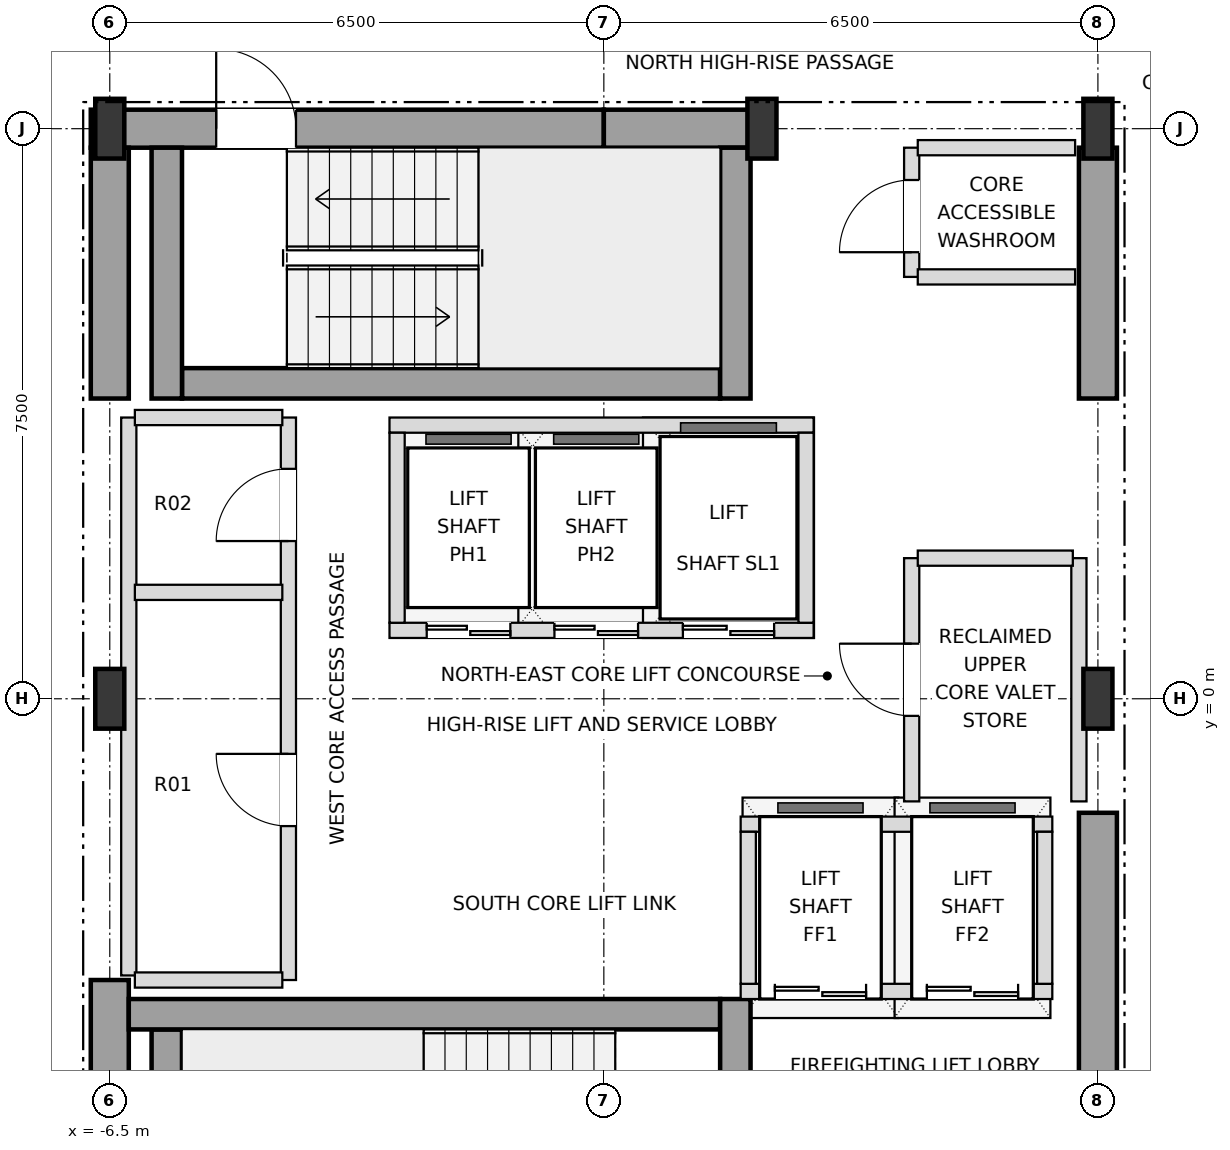
"""IFC4 building model, lengths in metres.
Left out: names, types, materials, properties, quantities, classifications, styles, units other than length and angle.
Written with IfcOpenShell. Run it as: python <this file> out.ifc"""

import sys

from ifc_helpers import new_model, si_unit, direction, frame, frame_2d, origin, origin_2d, place, context, subcontext, project, spatial, rectangle, i_section, extrude, element, fill, save


model = new_model("IFC4")
c1 = context("Model", 3, precision=1e-05, world=origin(), true_north=direction((0.0, 1.0)))
c2 = subcontext(c1, "Body", "Model", "MODEL_VIEW")
j1 = project(units=[si_unit("LENGTHUNIT", "METRE"), si_unit("PLANEANGLEUNIT", "RADIAN")], contexts=[c1])
p1 = place(None, origin())
s1 = spatial("IfcSite", under=j1, at=p1, CompositionType="ELEMENT")
p2 = place(p1, origin())
s2 = spatial("IfcBuilding", under=s1, at=p2, CompositionType="ELEMENT")
p3 = place(p2, frame((0.0, 0.0, 279.9)))
s3 = spatial("IfcBuildingStorey", under=s2, at=p3, CompositionType="ELEMENT", Elevation=279.9)
for number, where, z_axis, x_axis in (
    (1, (-6.5, 0.0, 0.0), (0.0, 0.0, 1.0), (1.0, 0.0, 0.0)),
    (2, (6.5, 0.0, 0.0), (0.0, 0.0, 1.0), (1.0, 0.0, 0.0)),
    (3, (-6.5, 7.5, 0.0), (0.0, 0.0, 1.0), (1.0, 0.0, 0.0)),
    (4, (2.08, 7.5, 0.0), (0.0, 0.0, 1.0), (1.0, 0.0, 0.0)),
    (5, (6.5, 7.5, 0.0), (0.0, 0.0, 1.0), (1.0, 0.0, 0.0)),
):
    element("IfcColumn", number, at=place(p3, frame(where, z_axis=z_axis, x_axis=x_axis)), inside=s3, PredefinedType="COLUMN", context=c2, shape_type="SweptSolid", body=[
        extrude(i_section(OverallWidth=0.382, OverallDepth=0.786, WebThickness=0.02, FlangeThickness=0.033, at=origin_2d()), origin(), (0.0, 0.0, 1.0), 3.6),
    ])
p4 = place(p3, frame((-6.75, 7.5, 0.0), z_axis=(0.0, 0.0, 1.0), x_axis=(1.0, 0.0, 0.0)))
e6 = element("IfcWall", 6, at=p4, inside=s3, PredefinedType="SHEAR", context=c2, shape_type="SweptSolid", body=[
    extrude(rectangle(XDim=6.75, YDim=0.5, at=frame_2d((3.375, 0.0))), origin(), (0.0, 0.0, 1.0), 3.38),
])
p5 = place(p4, frame((1.65, 0.0, 0.0)))
e7 = element("IfcOpeningElement", 7, at=p5, cuts=e6, PredefinedType="OPENING", context=c2, shape_type="SweptSolid", body=[
    extrude(rectangle(XDim=1.05, YDim=2.15, at=frame_2d((0.525, 1.075))), frame((0.0, 0.26, 0.0), z_axis=(0.0, -1.0, 0.0), x_axis=(1.0, 0.0, 0.0)), (0.0, 0.0, 1.0), 0.52),
])
p6 = place(p3, frame((0.0, 7.5, 0.0), z_axis=(0.0, 0.0, 1.0), x_axis=(1.0, 0.0, 0.0)))
e8 = element("IfcWall", 8, at=p6, inside=s3, PredefinedType="SHEAR", context=c2, shape_type="SweptSolid", body=[
    extrude(rectangle(XDim=2.08, YDim=0.5, at=frame_2d((1.04, 0.0))), origin(), (0.0, 0.0, 1.0), 3.38),
])
p7 = place(p3, frame((-6.5, -7.25, 0.0), z_axis=(0.0, 0.0, 1.0), x_axis=(0.0, 1.0, 0.0)))
e9 = element("IfcWall", 9, at=p7, inside=s3, PredefinedType="SHEAR", context=c2, shape_type="SweptSolid", body=[
    extrude(rectangle(XDim=3.55, YDim=0.5, at=frame_2d((1.775, 0.0))), origin(), (0.0, 0.0, 1.0), 3.38),
])
p8 = place(p3, frame((-6.5, 3.95, 0.0), z_axis=(0.0, 0.0, 1.0), x_axis=(0.0, 1.0, 0.0)))
e10 = element("IfcWall", 10, at=p8, inside=s3, PredefinedType="SHEAR", context=c2, shape_type="SweptSolid", body=[
    extrude(rectangle(XDim=3.3, YDim=0.5, at=frame_2d((1.65, 0.0))), origin(), (0.0, 0.0, 1.0), 3.38),
])
p9 = place(p3, frame((6.5, -7.25, 0.0), z_axis=(0.0, 0.0, 1.0), x_axis=(0.0, 1.0, 0.0)))
e11 = element("IfcWall", 11, at=p9, inside=s3, PredefinedType="SHEAR", context=c2, shape_type="SweptSolid", body=[
    extrude(rectangle(XDim=5.75, YDim=0.5, at=frame_2d((2.875, 0.0))), origin(), (0.0, 0.0, 1.0), 3.38),
])
p10 = place(p9, frame((0.85, 0.0, 0.0)))
e12 = element("IfcOpeningElement", 12, at=p10, cuts=e11, PredefinedType="OPENING", context=c2, shape_type="SweptSolid", body=[
    extrude(rectangle(XDim=1.05, YDim=2.15, at=frame_2d((0.525, 1.075))), frame((0.0, 0.26, 0.0), z_axis=(0.0, -1.0, 0.0), x_axis=(1.0, 0.0, 0.0)), (0.0, 0.0, 1.0), 0.52),
])
p11 = place(p3, frame((6.5, 3.95, 0.0), z_axis=(0.0, 0.0, 1.0), x_axis=(0.0, 1.0, 0.0)))
e13 = element("IfcWall", 13, at=p11, inside=s3, PredefinedType="SHEAR", context=c2, shape_type="SweptSolid", body=[
    extrude(rectangle(XDim=3.3, YDim=0.5, at=frame_2d((1.65, 0.0))), origin(), (0.0, 0.0, 1.0), 3.38),
])
p12 = place(p3, frame((-5.75, -7.25, 0.0), z_axis=(0.0, 0.0, 1.0), x_axis=(0.0, 1.0, 0.0)))
e14 = element("IfcWall", 14, at=p12, inside=s3, PredefinedType="SHEAR", context=c2, shape_type="SweptSolid", body=[
    extrude(rectangle(XDim=2.9, YDim=0.4, at=frame_2d((1.45, 0.0))), origin(), (0.0, 0.0, 1.0), 3.38),
])
p13 = place(p3, frame((-6.25, -4.15, 0.0), z_axis=(0.0, 0.0, 1.0), x_axis=(1.0, 0.0, 0.0)))
e15 = element("IfcWall", 15, at=p13, inside=s3, PredefinedType="SHEAR", context=c2, shape_type="SweptSolid", body=[
    extrude(rectangle(XDim=7.78, YDim=0.4, at=frame_2d((3.89, 0.0))), origin(), (0.0, 0.0, 1.0), 3.38),
])
p14 = place(p3, frame((1.73, -7.25, 0.0), z_axis=(0.0, 0.0, 1.0), x_axis=(0.0, 1.0, 0.0)))
e16 = element("IfcWall", 16, at=p14, inside=s3, PredefinedType="SHEAR", context=c2, shape_type="SweptSolid", body=[
    extrude(rectangle(XDim=3.3, YDim=0.4, at=frame_2d((1.65, 0.0))), origin(), (0.0, 0.0, 1.0), 3.38),
])
p15 = place(p14, frame((0.9, 0.0, 0.0)))
e17 = element("IfcOpeningElement", 17, at=p15, cuts=e16, PredefinedType="OPENING", context=c2, shape_type="SweptSolid", body=[
    extrude(rectangle(XDim=1.05, YDim=2.15, at=frame_2d((0.525, 1.075))), frame((0.0, 0.21, 0.0), z_axis=(0.0, -1.0, 0.0), x_axis=(1.0, 0.0, 0.0)), (0.0, 0.0, 1.0), 0.42),
])
p16 = place(p3, frame((-5.55, 4.15, 0.0), z_axis=(0.0, 0.0, 1.0), x_axis=(1.0, 0.0, 0.0)))
e18 = element("IfcWall", 18, at=p16, inside=s3, PredefinedType="SHEAR", context=c2, shape_type="SweptSolid", body=[
    extrude(rectangle(XDim=7.08, YDim=0.4, at=frame_2d((3.54, 0.0))), origin(), (0.0, 0.0, 1.0), 3.38),
])
for number, where, z_axis, x_axis in (
    (19, (1.73, 3.95, 0.0), (0.0, 0.0, 1.0), (0.0, 1.0, 0.0)),
    (20, (-5.75, 3.95, 0.0), (0.0, 0.0, 1.0), (0.0, 1.0, 0.0)),
):
    element("IfcWall", number, at=place(p3, frame(where, z_axis=z_axis, x_axis=x_axis)), inside=s3, PredefinedType="SHEAR", context=c2, shape_type="SweptSolid", body=[
        extrude(rectangle(XDim=3.3, YDim=0.4, at=frame_2d((1.65, 0.0))), origin(), (0.0, 0.0, 1.0), 3.38),
    ])
p17 = place(p3, frame((-2.82, 0.9, 0.0), z_axis=(0.0, 0.0, 1.0), x_axis=(1.0, 0.0, 0.0)))
e21 = element("IfcWall", 21, at=p17, inside=s3, PredefinedType="SOLIDWALL", context=c2, shape_type="SweptSolid", body=[
    extrude(rectangle(XDim=5.58, YDim=0.2, at=frame_2d((2.79, 0.0))), origin(), (0.0, 0.0, 1.0), 3.38),
])
p18 = place(p17, frame((0.49, 0.0, 0.0)))
e22 = element("IfcOpeningElement", 22, at=p18, cuts=e21, PredefinedType="OPENING", context=c2, shape_type="SweptSolid", body=[
    extrude(rectangle(XDim=1.1, YDim=2.15, at=frame_2d((0.55, 1.075))), frame((0.0, 0.11, 0.0), z_axis=(0.0, -1.0, 0.0), x_axis=(1.0, 0.0, 0.0)), (0.0, 0.0, 1.0), 0.22),
])
p19 = place(p17, frame((2.17, 0.0, 0.0)))
e23 = element("IfcOpeningElement", 23, at=p19, cuts=e21, PredefinedType="OPENING", context=c2, shape_type="SweptSolid", body=[
    extrude(rectangle(XDim=1.1, YDim=2.15, at=frame_2d((0.55, 1.075))), frame((0.0, 0.11, 0.0), z_axis=(0.0, -1.0, 0.0), x_axis=(1.0, 0.0, 0.0)), (0.0, 0.0, 1.0), 0.22),
])
p20 = place(p17, frame((3.86, 0.0, 0.0)))
e24 = element("IfcOpeningElement", 24, at=p20, cuts=e21, PredefinedType="OPENING", context=c2, shape_type="SweptSolid", body=[
    extrude(rectangle(XDim=1.2, YDim=2.2, at=frame_2d((0.6, 1.1))), frame((0.0, 0.11, 0.0), z_axis=(0.0, -1.0, 0.0), x_axis=(1.0, 0.0, 0.0)), (0.0, 0.0, 1.0), 0.22),
])
p21 = place(p3, frame((-2.82, 3.6, 0.0), z_axis=(0.0, 0.0, 1.0), x_axis=(1.0, 0.0, 0.0)))
e25 = element("IfcWall", 25, at=p21, inside=s3, PredefinedType="SOLIDWALL", context=c2, shape_type="SweptSolid", body=[
    extrude(rectangle(XDim=5.58, YDim=0.2, at=frame_2d((2.79, 0.0))), origin(), (0.0, 0.0, 1.0), 3.38),
])
for number, where, z_axis, x_axis in (
    (26, (-2.72, 1.0, 0.0), (0.0, 0.0, 1.0), (0.0, 1.0, 0.0)),
    (27, (2.66, 1.0, 0.0), (0.0, 0.0, 1.0), (0.0, 1.0, 0.0)),
):
    element("IfcWall", number, at=place(p3, frame(where, z_axis=z_axis, x_axis=x_axis)), inside=s3, PredefinedType="SOLIDWALL", context=c2, shape_type="SweptSolid", body=[
        extrude(rectangle(XDim=2.5, YDim=0.2, at=frame_2d((1.25, 0.0))), origin(), (0.0, 0.0, 1.0), 3.38),
    ])
p22 = place(p3, frame((1.8, -3.85, 0.0), z_axis=(0.0, 0.0, 1.0), x_axis=(1.0, 0.0, 0.0)))
e28 = element("IfcWall", 28, at=p22, inside=s3, PredefinedType="SOLIDWALL", context=c2, shape_type="SweptSolid", body=[
    extrude(rectangle(XDim=4.1, YDim=0.2, at=frame_2d((2.05, 0.0))), origin(), (0.0, 0.0, 1.0), 3.38),
])
p23 = place(p22, frame((0.45, 0.0, 0.0)))
e29 = element("IfcOpeningElement", 29, at=p23, cuts=e28, PredefinedType="OPENING", context=c2, shape_type="SweptSolid", body=[
    extrude(rectangle(XDim=1.2, YDim=2.2, at=frame_2d((0.6, 1.1))), frame((0.0, 0.11, 0.0), z_axis=(0.0, -1.0, 0.0), x_axis=(1.0, 0.0, 0.0)), (0.0, 0.0, 1.0), 0.22),
])
p24 = place(p22, frame((2.45, 0.0, 0.0)))
e30 = element("IfcOpeningElement", 30, at=p24, cuts=e28, PredefinedType="OPENING", context=c2, shape_type="SweptSolid", body=[
    extrude(rectangle(XDim=1.2, YDim=2.2, at=frame_2d((0.6, 1.1))), frame((0.0, 0.11, 0.0), z_axis=(0.0, -1.0, 0.0), x_axis=(1.0, 0.0, 0.0)), (0.0, 0.0, 1.0), 0.22),
])
p25 = place(p3, frame((1.8, -1.65, 0.0), z_axis=(0.0, 0.0, 1.0), x_axis=(1.0, 0.0, 0.0)))
e31 = element("IfcWall", 31, at=p25, inside=s3, PredefinedType="SOLIDWALL", context=c2, shape_type="SweptSolid", body=[
    extrude(rectangle(XDim=4.1, YDim=0.2, at=frame_2d((2.05, 0.0))), origin(), (0.0, 0.0, 1.0), 3.38),
])
for number, where, z_axis, x_axis in (
    (32, (1.9, -3.75, 0.0), (0.0, 0.0, 1.0), (0.0, 1.0, 0.0)),
    (33, (5.8, -3.75, 0.0), (0.0, 0.0, 1.0), (0.0, 1.0, 0.0)),
):
    element("IfcWall", number, at=place(p3, frame(where, z_axis=z_axis, x_axis=x_axis)), inside=s3, PredefinedType="SOLIDWALL", context=c2, shape_type="SweptSolid", body=[
        extrude(rectangle(XDim=2.0, YDim=0.2, at=frame_2d((1.0, 0.0))), origin(), (0.0, 0.0, 1.0), 3.38),
    ])
p26 = place(p3, frame((-6.25, -3.64, 0.0), z_axis=(0.0, 0.0, 1.0), x_axis=(0.0, 1.0, 0.0)))
e34 = element("IfcWall", 34, at=p26, inside=s3, PredefinedType="SOLIDWALL", context=c2, shape_type="SweptSolid", body=[
    extrude(rectangle(XDim=7.34, YDim=0.2, at=frame_2d((3.67, 0.0))), origin(), (0.0, 0.0, 1.0), 3.38),
])
p27 = place(p3, frame((-4.15, -3.7, 0.0), z_axis=(0.0, 0.0, 1.0), x_axis=(0.0, 1.0, 0.0)))
e35 = element("IfcWall", 35, at=p27, inside=s3, PredefinedType="SOLIDWALL", context=c2, shape_type="SweptSolid", body=[
    extrude(rectangle(XDim=7.4, YDim=0.2, at=frame_2d((3.7, 0.0))), origin(), (0.0, 0.0, 1.0), 3.38),
])
p28 = place(p27, frame((2.025, 0.0, 0.0)))
e36 = element("IfcOpeningElement", 36, at=p28, cuts=e35, PredefinedType="OPENING", context=c2, shape_type="SweptSolid", body=[
    extrude(rectangle(XDim=0.95, YDim=2.15, at=frame_2d((0.475, 1.075))), frame((0.0, 0.11, 0.0), z_axis=(0.0, -1.0, 0.0), x_axis=(1.0, 0.0, 0.0)), (0.0, 0.0, 1.0), 0.22),
])
p29 = place(p27, frame((5.775, 0.0, 0.0)))
e37 = element("IfcOpeningElement", 37, at=p29, cuts=e35, PredefinedType="OPENING", context=c2, shape_type="SweptSolid", body=[
    extrude(rectangle(XDim=0.95, YDim=2.15, at=frame_2d((0.475, 1.075))), frame((0.0, 0.11, 0.0), z_axis=(0.0, -1.0, 0.0), x_axis=(1.0, 0.0, 0.0)), (0.0, 0.0, 1.0), 0.22),
])
p30 = place(p3, frame((4.05, -1.35, 0.0), z_axis=(0.0, 0.0, 1.0), x_axis=(0.0, 1.0, 0.0)))
e38 = element("IfcWall", 38, at=p30, inside=s3, PredefinedType="SOLIDWALL", context=c2, shape_type="SweptSolid", body=[
    extrude(rectangle(XDim=3.2, YDim=0.2, at=frame_2d((1.6, 0.0))), origin(), (0.0, 0.0, 1.0), 3.38),
])
p31 = place(p30, frame((1.125, 0.0, 0.0)))
e39 = element("IfcOpeningElement", 39, at=p31, cuts=e38, PredefinedType="OPENING", context=c2, shape_type="SweptSolid", body=[
    extrude(rectangle(XDim=0.95, YDim=2.15, at=frame_2d((0.475, 1.075))), frame((0.0, 0.11, 0.0), z_axis=(0.0, -1.0, 0.0), x_axis=(1.0, 0.0, 0.0)), (0.0, 0.0, 1.0), 0.22),
])
p32 = place(p3, frame((4.05, 5.55, 0.0), z_axis=(0.0, 0.0, 1.0), x_axis=(0.0, 1.0, 0.0)))
e40 = element("IfcWall", 40, at=p32, inside=s3, PredefinedType="SOLIDWALL", context=c2, shape_type="SweptSolid", body=[
    extrude(rectangle(XDim=1.7, YDim=0.2, at=frame_2d((0.85, 0.0))), origin(), (0.0, 0.0, 1.0), 3.38),
])
p33 = place(p32, frame((0.325, 0.0, 0.0)))
e41 = element("IfcOpeningElement", 41, at=p33, cuts=e40, PredefinedType="OPENING", context=c2, shape_type="SweptSolid", body=[
    extrude(rectangle(XDim=0.95, YDim=2.15, at=frame_2d((0.475, 1.075))), frame((0.0, 0.11, 0.0), z_axis=(0.0, -1.0, 0.0), x_axis=(1.0, 0.0, 0.0)), (0.0, 0.0, 1.0), 0.22),
])
p34 = place(p3, frame((6.25, -1.35, 0.0), z_axis=(0.0, 0.0, 1.0), x_axis=(0.0, 1.0, 0.0)))
e42 = element("IfcWall", 42, at=p34, inside=s3, PredefinedType="SOLIDWALL", context=c2, shape_type="SweptSolid", body=[
    extrude(rectangle(XDim=3.2, YDim=0.2, at=frame_2d((1.6, 0.0))), origin(), (0.0, 0.0, 1.0), 3.38),
])
for number, where, z_axis, x_axis in (
    (43, (-6.17, -3.7, 0.0), (0.0, 0.0, 1.0), (1.0, 0.0, 0.0)),
    (44, (-6.17, 1.4, 0.0), (0.0, 0.0, 1.0), (1.0, 0.0, 0.0)),
):
    element("IfcWall", number, at=place(p3, frame(where, z_axis=z_axis, x_axis=x_axis)), inside=s3, PredefinedType="SOLIDWALL", context=c2, shape_type="SweptSolid", body=[
        extrude(rectangle(XDim=1.94, YDim=0.2, at=frame_2d((0.97, 0.0))), origin(), (0.0, 0.0, 1.0), 3.38),
    ])
p35 = place(p3, frame((4.13, 1.85, 0.0), z_axis=(0.0, 0.0, 1.0), x_axis=(1.0, 0.0, 0.0)))
e45 = element("IfcWall", 45, at=p35, inside=s3, PredefinedType="SOLIDWALL", context=c2, shape_type="SweptSolid", body=[
    extrude(rectangle(XDim=2.04, YDim=0.2, at=frame_2d((1.02, 0.0))), origin(), (0.0, 0.0, 1.0), 3.38),
])
p36 = place(p3, frame((-6.17, 3.7, 0.0), z_axis=(0.0, 0.0, 1.0), x_axis=(1.0, 0.0, 0.0)))
e46 = element("IfcWall", 46, at=p36, inside=s3, PredefinedType="SOLIDWALL", context=c2, shape_type="SweptSolid", body=[
    extrude(rectangle(XDim=1.94, YDim=0.2, at=frame_2d((0.97, 0.0))), origin(), (0.0, 0.0, 1.0), 3.38),
])
for number, where, z_axis, x_axis in (
    (47, (4.13, 5.55, 0.0), (0.0, 0.0, 1.0), (1.0, 0.0, 0.0)),
    (48, (4.13, 7.25, 0.0), (0.0, 0.0, 1.0), (1.0, 0.0, 0.0)),
):
    element("IfcWall", number, at=place(p3, frame(where, z_axis=z_axis, x_axis=x_axis)), inside=s3, PredefinedType="SOLIDWALL", context=c2, shape_type="SweptSolid", body=[
        extrude(rectangle(XDim=2.07, YDim=0.2, at=frame_2d((1.035, 0.0))), origin(), (0.0, 0.0, 1.0), 3.38),
    ])
p37 = place(p5, origin())
e49 = element("IfcDoor", 49, at=p37, inside=s3, OperationType="SINGLE_SWING_LEFT", PredefinedType="DOOR", context=c2, shape_type="SweptSolid", body=[
    extrude(rectangle(XDim=1.05, YDim=2.15, at=frame_2d((0.525, 1.075))), frame((0.0, 0.025, 0.0), z_axis=(0.0, -1.0, 0.0), x_axis=(1.0, 0.0, 0.0)), (0.0, 0.0, 1.0), 0.05),
])
fill(e7, e49)
p38 = place(p18, origin())
e50 = element("IfcDoor", 50, at=p38, inside=s3, OperationType="DOUBLE_DOOR_SLIDING", PredefinedType="DOOR", context=c2, shape_type="SweptSolid", body=[
    extrude(rectangle(XDim=1.1, YDim=2.15, at=frame_2d((0.55, 1.075))), frame((0.0, 0.025, 0.0), z_axis=(0.0, -1.0, 0.0), x_axis=(1.0, 0.0, 0.0)), (0.0, 0.0, 1.0), 0.05),
])
fill(e22, e50)
p39 = place(p19, origin())
e51 = element("IfcDoor", 51, at=p39, inside=s3, OperationType="DOUBLE_DOOR_SLIDING", PredefinedType="DOOR", context=c2, shape_type="SweptSolid", body=[
    extrude(rectangle(XDim=1.1, YDim=2.15, at=frame_2d((0.55, 1.075))), frame((0.0, 0.025, 0.0), z_axis=(0.0, -1.0, 0.0), x_axis=(1.0, 0.0, 0.0)), (0.0, 0.0, 1.0), 0.05),
])
fill(e23, e51)
p40 = place(p20, origin())
e52 = element("IfcDoor", 52, at=p40, inside=s3, OperationType="DOUBLE_DOOR_SLIDING", PredefinedType="DOOR", context=c2, shape_type="SweptSolid", body=[
    extrude(rectangle(XDim=1.2, YDim=2.2, at=frame_2d((0.6, 1.1))), frame((0.0, 0.025, 0.0), z_axis=(0.0, -1.0, 0.0), x_axis=(1.0, 0.0, 0.0)), (0.0, 0.0, 1.0), 0.05),
])
fill(e24, e52)
p41 = place(p23, origin())
e53 = element("IfcDoor", 53, at=p41, inside=s3, OperationType="DOUBLE_DOOR_SLIDING", PredefinedType="DOOR", context=c2, shape_type="SweptSolid", body=[
    extrude(rectangle(XDim=1.2, YDim=2.2, at=frame_2d((0.6, 1.1))), frame((0.0, 0.025, 0.0), z_axis=(0.0, -1.0, 0.0), x_axis=(1.0, 0.0, 0.0)), (0.0, 0.0, 1.0), 0.05),
])
fill(e29, e53)
p42 = place(p24, origin())
e54 = element("IfcDoor", 54, at=p42, inside=s3, OperationType="DOUBLE_DOOR_SLIDING", PredefinedType="DOOR", context=c2, shape_type="SweptSolid", body=[
    extrude(rectangle(XDim=1.2, YDim=2.2, at=frame_2d((0.6, 1.1))), frame((0.0, 0.025, 0.0), z_axis=(0.0, -1.0, 0.0), x_axis=(1.0, 0.0, 0.0)), (0.0, 0.0, 1.0), 0.05),
])
fill(e30, e54)
p43 = place(p28, origin())
e55 = element("IfcDoor", 55, at=p43, inside=s3, OperationType="SINGLE_SWING_RIGHT", PredefinedType="DOOR", context=c2, shape_type="SweptSolid", body=[
    extrude(rectangle(XDim=0.95, YDim=2.15, at=frame_2d((0.475, 1.075))), frame((0.0, 0.025, 0.0), z_axis=(0.0, -1.0, 0.0), x_axis=(1.0, 0.0, 0.0)), (0.0, 0.0, 1.0), 0.05),
])
fill(e36, e55)
p44 = place(p29, origin())
e56 = element("IfcDoor", 56, at=p44, inside=s3, OperationType="SINGLE_SWING_LEFT", PredefinedType="DOOR", context=c2, shape_type="SweptSolid", body=[
    extrude(rectangle(XDim=0.95, YDim=2.15, at=frame_2d((0.475, 1.075))), frame((0.0, 0.025, 0.0), z_axis=(0.0, -1.0, 0.0), x_axis=(1.0, 0.0, 0.0)), (0.0, 0.0, 1.0), 0.05),
])
fill(e37, e56)
p45 = place(p31, origin())
e57 = element("IfcDoor", 57, at=p45, inside=s3, OperationType="SINGLE_SWING_RIGHT", PredefinedType="DOOR", context=c2, shape_type="SweptSolid", body=[
    extrude(rectangle(XDim=0.95, YDim=2.15, at=frame_2d((0.475, 1.075))), frame((0.0, 0.025, 0.0), z_axis=(0.0, -1.0, 0.0), x_axis=(1.0, 0.0, 0.0)), (0.0, 0.0, 1.0), 0.05),
])
fill(e39, e57)
p46 = place(p33, origin())
e58 = element("IfcDoor", 58, at=p46, inside=s3, OperationType="SINGLE_SWING_LEFT", PredefinedType="DOOR", context=c2, shape_type="SweptSolid", body=[
    extrude(rectangle(XDim=0.95, YDim=2.15, at=frame_2d((0.475, 1.075))), frame((0.0, 0.025, 0.0), z_axis=(0.0, -1.0, 0.0), x_axis=(1.0, 0.0, 0.0)), (0.0, 0.0, 1.0), 0.05),
])
fill(e41, e58)
save(model, sys.argv[1])
